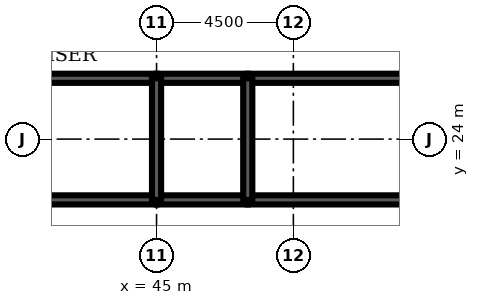
"""IFC4 building model, lengths in metres.
Left out: names, types, materials, properties, quantities, classifications, styles, units other than length and angle.
Written with IfcOpenShell. Run it as: python <this file> out.ifc"""

import sys

from ifc_helpers import new_model, si_unit, direction, frame, frame_2d, origin, place, context, subcontext, project, spatial, rectangle, extrude, element, fill, save


model = new_model("IFC4")
c1 = context("Model", 3, precision=1e-05, world=origin(), true_north=direction((0.0, 1.0)))
c2 = subcontext(c1, "Body", "Model", "MODEL_VIEW")
j1 = project(units=[si_unit("LENGTHUNIT", "METRE"), si_unit("PLANEANGLEUNIT", "RADIAN")], contexts=[c1])
p1 = place(None, origin())
s1 = spatial("IfcSite", under=j1, at=p1, CompositionType="ELEMENT")
p2 = place(p1, origin())
s2 = spatial("IfcBuilding", under=s1, at=p2, CompositionType="ELEMENT")
p3 = place(p2, frame((0.0, 0.0, 329.9)))
s3 = spatial("IfcBuildingStorey", under=s2, at=p3, CompositionType="ELEMENT", Elevation=329.9)
p4 = place(p3, frame((36.0, 22.0, 0.0), z_axis=(0.0, 0.0, 1.0), x_axis=(1.0, 0.0, 0.0)))
e1 = element("IfcWall", 1, at=p4, inside=s3, PredefinedType="SOLIDWALL", context=c2, shape_type="SweptSolid", body=[
    extrude(rectangle(XDim=9.0, YDim=0.3, at=frame_2d((4.5, 0.0))), origin(), (0.0, 0.0, 1.0), 4.2),
])
p5 = place(p4, frame((4.0, 0.0, 0.0)))
e2 = element("IfcOpeningElement", 2, at=p5, cuts=e1, PredefinedType="OPENING", context=c2, shape_type="SweptSolid", body=[
    extrude(rectangle(XDim=1.0, YDim=2.1, at=frame_2d((0.5, 1.05))), frame((0.0, 0.16, 0.0), z_axis=(0.0, -1.0, 0.0), x_axis=(1.0, 0.0, 0.0)), (0.0, 0.0, 1.0), 0.32),
])
p6 = place(p3, frame((45.0, 22.0, 0.0), z_axis=(0.0, 0.0, 1.0), x_axis=(1.0, 0.0, 0.0)))
e3 = element("IfcWall", 3, at=p6, inside=s3, PredefinedType="SOLIDWALL", context=c2, shape_type="SweptSolid", body=[
    extrude(rectangle(XDim=3.0, YDim=0.3, at=frame_2d((1.5, 0.0))), origin(), (0.0, 0.0, 1.0), 4.2),
])
p7 = place(p6, frame((1.0, 0.0, 0.0)))
e4 = element("IfcOpeningElement", 4, at=p7, cuts=e3, PredefinedType="OPENING", context=c2, shape_type="SweptSolid", body=[
    extrude(rectangle(XDim=1.0, YDim=2.1, at=frame_2d((0.5, 1.05))), frame((0.0, 0.16, 0.0), z_axis=(0.0, -1.0, 0.0), x_axis=(1.0, 0.0, 0.0)), (0.0, 0.0, 1.0), 0.32),
])
p8 = place(p3, frame((48.0, 22.0, 0.0), z_axis=(0.0, 0.0, 1.0), x_axis=(1.0, 0.0, 0.0)))
e5 = element("IfcWall", 5, at=p8, inside=s3, PredefinedType="SOLIDWALL", context=c2, shape_type="SweptSolid", body=[
    extrude(rectangle(XDim=6.0, YDim=0.3, at=frame_2d((3.0, 0.0))), origin(), (0.0, 0.0, 1.0), 4.2),
])
p9 = place(p8, frame((2.0, 0.0, 0.0)))
e6 = element("IfcOpeningElement", 6, at=p9, cuts=e5, PredefinedType="OPENING", context=c2, shape_type="SweptSolid", body=[
    extrude(rectangle(XDim=1.0, YDim=2.1, at=frame_2d((0.5, 1.05))), frame((0.0, 0.16, 0.0), z_axis=(0.0, -1.0, 0.0), x_axis=(1.0, 0.0, 0.0)), (0.0, 0.0, 1.0), 0.32),
])
p10 = place(p8, frame((4.4, 0.0, 0.0)))
e7 = element("IfcOpeningElement", 7, at=p10, cuts=e5, PredefinedType="OPENING", context=c2, shape_type="SweptSolid", body=[
    extrude(rectangle(XDim=1.0, YDim=2.1, at=frame_2d((0.5, 1.05))), frame((0.0, 0.16, 0.0), z_axis=(0.0, -1.0, 0.0), x_axis=(1.0, 0.0, 0.0)), (0.0, 0.0, 1.0), 0.32),
])
p11 = place(p3, frame((36.0, 26.0, 0.0), z_axis=(0.0, 0.0, 1.0), x_axis=(1.0, 0.0, 0.0)))
e8 = element("IfcWall", 8, at=p11, inside=s3, PredefinedType="SOLIDWALL", context=c2, shape_type="SweptSolid", body=[
    extrude(rectangle(XDim=9.0, YDim=0.3, at=frame_2d((4.5, 0.0))), origin(), (0.0, 0.0, 1.0), 4.2),
])
p12 = place(p3, frame((45.0, 26.0, 0.0), z_axis=(0.0, 0.0, 1.0), x_axis=(1.0, 0.0, 0.0)))
e9 = element("IfcWall", 9, at=p12, inside=s3, PredefinedType="SOLIDWALL", context=c2, shape_type="SweptSolid", body=[
    extrude(rectangle(XDim=3.0, YDim=0.3, at=frame_2d((1.5, 0.0))), origin(), (0.0, 0.0, 1.0), 4.2),
])
p13 = place(p3, frame((48.0, 26.0, 0.0), z_axis=(0.0, 0.0, 1.0), x_axis=(1.0, 0.0, 0.0)))
e10 = element("IfcWall", 10, at=p13, inside=s3, PredefinedType="SOLIDWALL", context=c2, shape_type="SweptSolid", body=[
    extrude(rectangle(XDim=6.0, YDim=0.3, at=frame_2d((3.0, 0.0))), origin(), (0.0, 0.0, 1.0), 4.2),
])
for number, where, z_axis, x_axis in (
    (11, (45.0, 22.0, 0.0), (0.0, 0.0, 1.0), (0.0, 1.0, 0.0)),
    (12, (48.0, 22.0, 0.0), (0.0, 0.0, 1.0), (0.0, 1.0, 0.0)),
):
    element("IfcWall", number, at=place(p3, frame(where, z_axis=z_axis, x_axis=x_axis)), inside=s3, PredefinedType="SOLIDWALL", context=c2, shape_type="SweptSolid", body=[
        extrude(rectangle(XDim=4.0, YDim=0.3, at=frame_2d((2.0, 0.0))), origin(), (0.0, 0.0, 1.0), 4.2),
    ])
p14 = place(p3, frame((42.5, 22.15, 0.0), z_axis=(0.0, 0.0, 1.0), x_axis=(0.0, 1.0, 0.0)))
e13 = element("IfcWall", 13, at=p14, inside=s3, PredefinedType="PARTITIONING", context=c2, shape_type="SweptSolid", body=[
    extrude(rectangle(XDim=3.7, YDim=0.15, at=frame_2d((1.85, 0.0))), origin(), (0.0, 0.0, 1.0), 3.0),
])
p15 = place(p14, frame((2.2, 0.0, 0.0)))
e14 = element("IfcOpeningElement", 14, at=p15, cuts=e13, PredefinedType="OPENING", context=c2, shape_type="SweptSolid", body=[
    extrude(rectangle(XDim=1.0, YDim=2.1, at=frame_2d((0.5, 1.05))), frame((0.0, 0.085, 0.0), z_axis=(0.0, -1.0, 0.0), x_axis=(1.0, 0.0, 0.0)), (0.0, 0.0, 1.0), 0.17),
])
p16 = place(p3, frame((52.075, 22.15, 0.0), z_axis=(0.0, 0.0, 1.0), x_axis=(0.0, 1.0, 0.0)))
e15 = element("IfcWall", 15, at=p16, inside=s3, PredefinedType="PARTITIONING", context=c2, shape_type="SweptSolid", body=[
    extrude(rectangle(XDim=3.7, YDim=0.15, at=frame_2d((1.85, 0.0))), origin(), (0.0, 0.0, 1.0), 3.0),
])
p17 = place(p15, origin())
e16 = element("IfcDoor", 16, at=p17, inside=s3, OperationType="SINGLE_SWING_RIGHT", PredefinedType="DOOR", context=c2, shape_type="SweptSolid", body=[
    extrude(rectangle(XDim=1.0, YDim=2.1, at=frame_2d((0.5, 1.05))), frame((0.0, 0.025, 0.0), z_axis=(0.0, -1.0, 0.0), x_axis=(1.0, 0.0, 0.0)), (0.0, 0.0, 1.0), 0.05),
])
fill(e14, e16)
p18 = place(p7, origin())
e17 = element("IfcDoor", 17, at=p18, inside=s3, OperationType="SINGLE_SWING_LEFT", PredefinedType="DOOR", context=c2, shape_type="SweptSolid", body=[
    extrude(rectangle(XDim=1.0, YDim=2.1, at=frame_2d((0.5, 1.05))), frame((0.0, 0.025, 0.0), z_axis=(0.0, -1.0, 0.0), x_axis=(1.0, 0.0, 0.0)), (0.0, 0.0, 1.0), 0.05),
])
fill(e4, e17)
p19 = place(p9, origin())
e18 = element("IfcDoor", 18, at=p19, inside=s3, OperationType="SINGLE_SWING_LEFT", PredefinedType="DOOR", context=c2, shape_type="SweptSolid", body=[
    extrude(rectangle(XDim=1.0, YDim=2.1, at=frame_2d((0.5, 1.05))), frame((0.0, 0.025, 0.0), z_axis=(0.0, -1.0, 0.0), x_axis=(1.0, 0.0, 0.0)), (0.0, 0.0, 1.0), 0.05),
])
fill(e6, e18)
p20 = place(p10, origin())
e19 = element("IfcDoor", 19, at=p20, inside=s3, OperationType="SINGLE_SWING_RIGHT", PredefinedType="DOOR", context=c2, shape_type="SweptSolid", body=[
    extrude(rectangle(XDim=1.0, YDim=2.1, at=frame_2d((0.5, 1.05))), frame((0.0, 0.025, 0.0), z_axis=(0.0, -1.0, 0.0), x_axis=(1.0, 0.0, 0.0)), (0.0, 0.0, 1.0), 0.05),
])
fill(e7, e19)
save(model, sys.argv[1])
